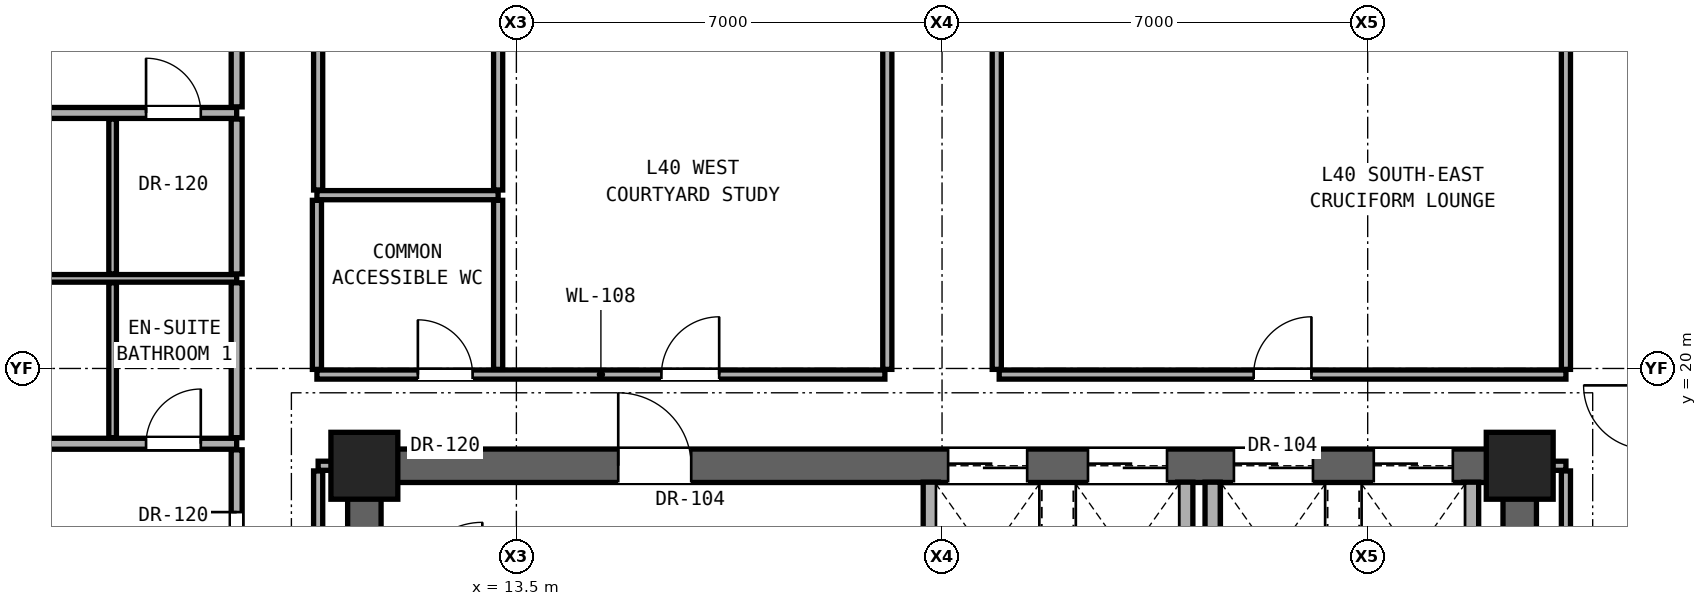
"""IFC4 building model, lengths in metres.
Left out: names, types, materials, properties, quantities, classifications, styles, units other than length and angle.
Written with IfcOpenShell. Run it as: python <this file> out.ifc"""

import sys

from ifc_helpers import new_model, si_unit, direction, frame, frame_2d, origin, origin_2d, place, context, subcontext, project, spatial, rectangle, extrude, element, fill, save


model = new_model("IFC4")
c1 = context("Model", 3, precision=1e-05, world=origin(), true_north=direction((0.0, 1.0)))
c2 = subcontext(c1, "Body", "Model", "MODEL_VIEW")
j1 = project(units=[si_unit("LENGTHUNIT", "METRE"), si_unit("PLANEANGLEUNIT", "RADIAN")], contexts=[c1])
p1 = place(None, origin())
s1 = spatial("IfcSite", under=j1, at=p1, CompositionType="ELEMENT")
p2 = place(p1, origin())
s2 = spatial("IfcBuilding", under=s1, at=p2, CompositionType="ELEMENT")
p3 = place(p2, frame((0.0, 0.0, 141.2)))
s3 = spatial("IfcBuildingStorey", under=s2, at=p3, CompositionType="ELEMENT", Elevation=141.2)
for number, where, z_axis, x_axis in (
    (1, (11.0, 18.4, 0.0), (0.0, 0.0, 1.0), (1.0, 0.0, 0.0)),
    (2, (30.0, 18.4, 0.0), (0.0, 0.0, 1.0), (1.0, 0.0, 0.0)),
):
    element("IfcColumn", number, at=place(p3, frame(where, z_axis=z_axis, x_axis=x_axis)), inside=s3, PredefinedType="COLUMN", context=c2, shape_type="SweptSolid", body=[
        extrude(rectangle(XDim=1.1, YDim=1.1, at=origin_2d()), origin(), (0.0, 0.0, 1.0), 3.3),
    ])
for number, where, z_axis, x_axis in (
    (3, (11.0, 12.4, 0.0), (0.0, 0.0, 1.0), (0.0, 1.0, 0.0)),
    (4, (30.0, 12.4, 0.0), (0.0, 0.0, 1.0), (0.0, 1.0, 0.0)),
):
    element("IfcWall", number, at=place(p3, frame(where, z_axis=z_axis, x_axis=x_axis)), inside=s3, PredefinedType="SHEAR", context=c2, shape_type="SweptSolid", body=[
        extrude(rectangle(XDim=6.0, YDim=0.55, at=frame_2d((3.0, 0.0))), origin(), (0.0, 0.0, 1.0), 3.08),
    ])
p4 = place(p3, frame((11.0, 18.4, 0.0), z_axis=(0.0, 0.0, 1.0), x_axis=(1.0, 0.0, 0.0)))
e5 = element("IfcWall", 5, at=p4, inside=s3, PredefinedType="SHEAR", context=c2, shape_type="SweptSolid", body=[
    extrude(rectangle(XDim=19.0, YDim=0.55, at=frame_2d((9.5, 0.0))), origin(), (0.0, 0.0, 1.0), 3.08),
])
p5 = place(p4, frame((4.175, 0.0, 0.0)))
e6 = element("IfcOpeningElement", 6, at=p5, cuts=e5, PredefinedType="OPENING", context=c2, shape_type="SweptSolid", body=[
    extrude(rectangle(XDim=1.2, YDim=2.25, at=frame_2d((0.6, 1.125))), frame((0.0, 0.285, 0.0), z_axis=(0.0, -1.0, 0.0), x_axis=(1.0, 0.0, 0.0)), (0.0, 0.0, 1.0), 0.57),
])
p6 = place(p4, frame((9.6, 0.0, 0.0)))
e7 = element("IfcOpeningElement", 7, at=p6, cuts=e5, PredefinedType="OPENING", context=c2, shape_type="SweptSolid", body=[
    extrude(rectangle(XDim=1.3, YDim=2.3, at=frame_2d((0.65, 1.15))), frame((0.0, 0.285, 0.0), z_axis=(0.0, -1.0, 0.0), x_axis=(1.0, 0.0, 0.0)), (0.0, 0.0, 1.0), 0.57),
])
p7 = place(p4, frame((11.9, 0.0, 0.0)))
e8 = element("IfcOpeningElement", 8, at=p7, cuts=e5, PredefinedType="OPENING", context=c2, shape_type="SweptSolid", body=[
    extrude(rectangle(XDim=1.3, YDim=2.3, at=frame_2d((0.65, 1.15))), frame((0.0, 0.285, 0.0), z_axis=(0.0, -1.0, 0.0), x_axis=(1.0, 0.0, 0.0)), (0.0, 0.0, 1.0), 0.57),
])
p8 = place(p4, frame((14.3, 0.0, 0.0)))
e9 = element("IfcOpeningElement", 9, at=p8, cuts=e5, PredefinedType="OPENING", context=c2, shape_type="SweptSolid", body=[
    extrude(rectangle(XDim=1.3, YDim=2.3, at=frame_2d((0.65, 1.15))), frame((0.0, 0.285, 0.0), z_axis=(0.0, -1.0, 0.0), x_axis=(1.0, 0.0, 0.0)), (0.0, 0.0, 1.0), 0.57),
])
p9 = place(p4, frame((16.6, 0.0, 0.0)))
e10 = element("IfcOpeningElement", 10, at=p9, cuts=e5, PredefinedType="OPENING", context=c2, shape_type="SweptSolid", body=[
    extrude(rectangle(XDim=1.3, YDim=2.3, at=frame_2d((0.65, 1.15))), frame((0.0, 0.285, 0.0), z_axis=(0.0, -1.0, 0.0), x_axis=(1.0, 0.0, 0.0)), (0.0, 0.0, 1.0), 0.57),
])
for number, where, z_axis, x_axis in (
    (11, (10.24, 18.4, 0.0), (0.0, 0.0, 1.0), (1.0, 0.0, 0.0)),
    (12, (30.27, 18.4, 0.0), (0.0, 0.0, 1.0), (1.0, 0.0, 0.0)),
):
    element("IfcWall", number, at=place(p3, frame(where, z_axis=z_axis, x_axis=x_axis)), inside=s3, PredefinedType="PARTITIONING", context=c2, shape_type="SweptSolid", body=[
        extrude(rectangle(XDim=0.49, YDim=0.15, at=frame_2d((0.245, 0.0))), origin(), (0.0, 0.0, 1.0), 2.456),
    ])
p10 = place(p3, frame((-1.34, 18.762, 0.0), z_axis=(0.0, 0.0, 1.0), x_axis=(1.0, 0.0, 0.0)))
e13 = element("IfcWall", 13, at=p10, inside=s3, PredefinedType="PARTITIONING", context=c2, shape_type="SweptSolid", body=[
    extrude(rectangle(XDim=10.24, YDim=0.18, at=frame_2d((5.12, 0.0))), origin(), (0.0, 0.0, 1.0), 2.299),
])
p11 = place(p10, frame((4.245, 0.0, 0.0)))
e14 = element("IfcOpeningElement", 14, at=p11, cuts=e13, PredefinedType="OPENING", context=c2, shape_type="SweptSolid", body=[
    extrude(rectangle(XDim=0.95, YDim=2.15, at=frame_2d((0.475, 1.075))), frame((0.0, 0.1, 0.0), z_axis=(0.0, -1.0, 0.0), x_axis=(1.0, 0.0, 0.0)), (0.0, 0.0, 1.0), 0.2),
])
p12 = place(p10, frame((8.75, 0.0, 0.0)))
e15 = element("IfcOpeningElement", 15, at=p12, cuts=e13, PredefinedType="OPENING", context=c2, shape_type="SweptSolid", body=[
    extrude(rectangle(XDim=0.9, YDim=2.1, at=frame_2d((0.45, 1.05))), frame((0.0, 0.1, 0.0), z_axis=(0.0, -1.0, 0.0), x_axis=(1.0, 0.0, 0.0)), (0.0, 0.0, 1.0), 0.2),
])
p13 = place(p3, frame((10.22, 19.9, 0.0), z_axis=(0.0, 0.0, 1.0), x_axis=(1.0, 0.0, 0.0)))
e16 = element("IfcWall", 16, at=p13, inside=s3, PredefinedType="PARTITIONING", context=c2, shape_type="SweptSolid", body=[
    extrude(rectangle(XDim=9.34, YDim=0.15, at=frame_2d((4.67, 0.0))), origin(), (0.0, 0.0, 1.0), 2.216),
])
p14 = place(p13, frame((1.66, 0.0, 0.0)))
e17 = element("IfcOpeningElement", 17, at=p14, cuts=e16, PredefinedType="OPENING", context=c2, shape_type="SweptSolid", body=[
    extrude(rectangle(XDim=0.9, YDim=2.1, at=frame_2d((0.45, 1.05))), frame((0.0, 0.085, 0.0), z_axis=(0.0, -1.0, 0.0), x_axis=(1.0, 0.0, 0.0)), (0.0, 0.0, 1.0), 0.17),
])
p15 = place(p13, frame((5.665, 0.0, 0.0)))
e18 = element("IfcOpeningElement", 18, at=p15, cuts=e16, PredefinedType="OPENING", context=c2, shape_type="SweptSolid", body=[
    extrude(rectangle(XDim=0.95, YDim=2.15, at=frame_2d((0.475, 1.075))), frame((0.0, 0.085, 0.0), z_axis=(0.0, -1.0, 0.0), x_axis=(1.0, 0.0, 0.0)), (0.0, 0.0, 1.0), 0.17),
])
p16 = place(p3, frame((21.44, 19.9, 0.0), z_axis=(0.0, 0.0, 1.0), x_axis=(1.0, 0.0, 0.0)))
e19 = element("IfcWall", 19, at=p16, inside=s3, PredefinedType="PARTITIONING", context=c2, shape_type="SweptSolid", body=[
    extrude(rectangle(XDim=9.32, YDim=0.15, at=frame_2d((4.66, 0.0))), origin(), (0.0, 0.0, 1.0), 2.216),
])
p17 = place(p16, frame((4.185, 0.0, 0.0)))
e20 = element("IfcOpeningElement", 20, at=p17, cuts=e19, PredefinedType="OPENING", context=c2, shape_type="SweptSolid", body=[
    extrude(rectangle(XDim=0.95, YDim=2.15, at=frame_2d((0.475, 1.075))), frame((0.0, 0.085, 0.0), z_axis=(0.0, -1.0, 0.0), x_axis=(1.0, 0.0, 0.0)), (0.0, 0.0, 1.0), 0.17),
])
p18 = place(p3, frame((-1.34, 21.482, 0.0), z_axis=(0.0, 0.0, 1.0), x_axis=(1.0, 0.0, 0.0)))
e21 = element("IfcWall", 21, at=p18, inside=s3, PredefinedType="PARTITIONING", context=c2, shape_type="SweptSolid", body=[
    extrude(rectangle(XDim=10.24, YDim=0.125, at=frame_2d((5.12, 0.0))), origin(), (0.0, 0.0, 1.0), 2.299),
])
p19 = place(p3, frame((10.22, 22.85, 0.0), z_axis=(0.0, 0.0, 1.0), x_axis=(1.0, 0.0, 0.0)))
e22 = element("IfcWall", 22, at=p19, inside=s3, PredefinedType="PARTITIONING", context=c2, shape_type="SweptSolid", body=[
    extrude(rectangle(XDim=2.98, YDim=0.15, at=frame_2d((1.49, 0.0))), origin(), (0.0, 0.0, 1.0), 2.216),
])
p20 = place(p3, frame((-1.34, 24.202, 0.0), z_axis=(0.0, 0.0, 1.0), x_axis=(1.0, 0.0, 0.0)))
e23 = element("IfcWall", 23, at=p20, inside=s3, PredefinedType="PARTITIONING", context=c2, shape_type="SweptSolid", body=[
    extrude(rectangle(XDim=10.24, YDim=0.18, at=frame_2d((5.12, 0.0))), origin(), (0.0, 0.0, 1.0), 2.299),
])
p21 = place(p20, frame((4.245, 0.0, 0.0)))
e24 = element("IfcOpeningElement", 24, at=p21, cuts=e23, PredefinedType="OPENING", context=c2, shape_type="SweptSolid", body=[
    extrude(rectangle(XDim=0.95, YDim=2.15, at=frame_2d((0.475, 1.075))), frame((0.0, 0.1, 0.0), z_axis=(0.0, -1.0, 0.0), x_axis=(1.0, 0.0, 0.0)), (0.0, 0.0, 1.0), 0.2),
])
p22 = place(p20, frame((8.75, 0.0, 0.0)))
e25 = element("IfcOpeningElement", 25, at=p22, cuts=e23, PredefinedType="OPENING", context=c2, shape_type="SweptSolid", body=[
    extrude(rectangle(XDim=0.9, YDim=2.1, at=frame_2d((0.45, 1.05))), frame((0.0, 0.1, 0.0), z_axis=(0.0, -1.0, 0.0), x_axis=(1.0, 0.0, 0.0)), (0.0, 0.0, 1.0), 0.2),
])
p23 = place(p3, frame((6.86, 18.862, 0.0), z_axis=(0.0, 0.0, 1.0), x_axis=(0.0, 1.0, 0.0)))
e26 = element("IfcWall", 26, at=p23, inside=s3, PredefinedType="PARTITIONING", context=c2, shape_type="SweptSolid", body=[
    extrude(rectangle(XDim=2.547, YDim=0.125, at=frame_2d((1.274, 0.0))), origin(), (0.0, 0.0, 1.0), 3.08),
])
p24 = place(p3, frame((6.86, 21.554, 0.0), z_axis=(0.0, 0.0, 1.0), x_axis=(0.0, 1.0, 0.0)))
e27 = element("IfcWall", 27, at=p24, inside=s3, PredefinedType="PARTITIONING", context=c2, shape_type="SweptSolid", body=[
    extrude(rectangle(XDim=2.548, YDim=0.125, at=frame_2d((1.274, 0.0))), origin(), (0.0, 0.0, 1.0), 3.08),
])
p25 = place(p3, frame((8.9, 14.364, 0.0), z_axis=(0.0, 0.0, 1.0), x_axis=(0.0, 1.0, 0.0)))
e28 = element("IfcWall", 28, at=p25, inside=s3, PredefinedType="PARTITIONING", context=c2, shape_type="SweptSolid", body=[
    extrude(rectangle(XDim=4.298, YDim=0.18, at=frame_2d((2.149, 0.0))), origin(), (0.0, 0.0, 1.0), 2.456),
])
p26 = place(p25, frame((2.224, 0.0, 0.0)))
e29 = element("IfcOpeningElement", 29, at=p26, cuts=e28, PredefinedType="OPENING", context=c2, shape_type="SweptSolid", body=[
    extrude(rectangle(XDim=1.05, YDim=2.2, at=frame_2d((0.525, 1.1))), frame((0.0, 0.1, 0.0), z_axis=(0.0, -1.0, 0.0), x_axis=(1.0, 0.0, 0.0)), (0.0, 0.0, 1.0), 0.2),
])
p27 = place(p3, frame((8.9, 18.862, 0.0), z_axis=(0.0, 0.0, 1.0), x_axis=(0.0, 1.0, 0.0)))
e30 = element("IfcWall", 30, at=p27, inside=s3, PredefinedType="PARTITIONING", context=c2, shape_type="SweptSolid", body=[
    extrude(rectangle(XDim=2.547, YDim=0.18, at=frame_2d((1.274, 0.0))), origin(), (0.0, 0.0, 1.0), 3.08),
])
p28 = place(p3, frame((8.9, 21.554, 0.0), z_axis=(0.0, 0.0, 1.0), x_axis=(0.0, 1.0, 0.0)))
e31 = element("IfcWall", 31, at=p28, inside=s3, PredefinedType="PARTITIONING", context=c2, shape_type="SweptSolid", body=[
    extrude(rectangle(XDim=2.548, YDim=0.18, at=frame_2d((1.274, 0.0))), origin(), (0.0, 0.0, 1.0), 3.08),
])
p29 = place(p3, frame((8.9, 24.302, 0.0), z_axis=(0.0, 0.0, 1.0), x_axis=(0.0, 1.0, 0.0)))
e32 = element("IfcWall", 32, at=p29, inside=s3, PredefinedType="PARTITIONING", context=c2, shape_type="SweptSolid", body=[
    extrude(rectangle(XDim=3.406, YDim=0.18, at=frame_2d((1.703, 0.0))), origin(), (0.0, 0.0, 1.0), 2.299),
])
p30 = place(p29, frame((1.178, 0.0, 0.0)))
e33 = element("IfcOpeningElement", 33, at=p30, cuts=e32, PredefinedType="OPENING", context=c2, shape_type="SweptSolid", body=[
    extrude(rectangle(XDim=1.05, YDim=2.2, at=frame_2d((0.525, 1.1))), frame((0.0, 0.1, 0.0), z_axis=(0.0, -1.0, 0.0), x_axis=(1.0, 0.0, 0.0)), (0.0, 0.0, 1.0), 0.2),
])
p31 = place(p3, frame((10.22, 19.985, 0.0), z_axis=(0.0, 0.0, 1.0), x_axis=(0.0, 1.0, 0.0)))
e34 = element("IfcWall", 34, at=p31, inside=s3, PredefinedType="PARTITIONING", context=c2, shape_type="SweptSolid", body=[
    extrude(rectangle(XDim=2.78, YDim=0.15, at=frame_2d((1.39, 0.0))), origin(), (0.0, 0.0, 1.0), 3.08),
])
p32 = place(p3, frame((10.24, 12.335, 0.0), z_axis=(0.0, 0.0, 1.0), x_axis=(0.0, 1.0, 0.0)))
e35 = element("IfcWall", 35, at=p32, inside=s3, PredefinedType="PARTITIONING", context=c2, shape_type="SweptSolid", body=[
    extrude(rectangle(XDim=5.98, YDim=0.15, at=frame_2d((2.99, 0.0))), origin(), (0.0, 0.0, 1.0), 2.456),
])
p33 = place(p3, frame((10.24, 22.935, 0.0), z_axis=(0.0, 0.0, 1.0), x_axis=(0.0, 1.0, 0.0)))
e36 = element("IfcWall", 36, at=p33, inside=s3, PredefinedType="PARTITIONING", context=c2, shape_type="SweptSolid", body=[
    extrude(rectangle(XDim=2.58, YDim=0.15, at=frame_2d((1.29, 0.0))), origin(), (0.0, 0.0, 1.0), 2.299),
])
p34 = place(p3, frame((13.2, 19.985, 0.0), z_axis=(0.0, 0.0, 1.0), x_axis=(0.0, 1.0, 0.0)))
e37 = element("IfcWall", 37, at=p34, inside=s3, PredefinedType="PARTITIONING", context=c2, shape_type="SweptSolid", body=[
    extrude(rectangle(XDim=2.78, YDim=0.15, at=frame_2d((1.39, 0.0))), origin(), (0.0, 0.0, 1.0), 3.08),
])
p35 = place(p3, frame((13.2, 22.935, 0.0), z_axis=(0.0, 0.0, 1.0), x_axis=(0.0, 1.0, 0.0)))
e38 = element("IfcWall", 38, at=p35, inside=s3, PredefinedType="PARTITIONING", context=c2, shape_type="SweptSolid", body=[
    extrude(rectangle(XDim=2.58, YDim=0.15, at=frame_2d((1.29, 0.0))), origin(), (0.0, 0.0, 1.0), 2.216),
])
p36 = place(p3, frame((19.6, 19.985, 0.0), z_axis=(0.0, 0.0, 1.0), x_axis=(0.0, 1.0, 0.0)))
e39 = element("IfcWall", 39, at=p36, inside=s3, PredefinedType="PARTITIONING", context=c2, shape_type="SweptSolid", body=[
    extrude(rectangle(XDim=5.53, YDim=0.15, at=frame_2d((2.765, 0.0))), origin(), (0.0, 0.0, 1.0), 2.216),
])
p37 = place(p3, frame((20.315, 16.555, 0.0), z_axis=(0.0, 0.0, 1.0), x_axis=(0.0, 1.0, 0.0)))
e40 = element("IfcWall", 40, at=p37, inside=s3, PredefinedType="SOLIDWALL", context=c2, shape_type="SweptSolid", body=[
    extrude(rectangle(XDim=1.575, YDim=0.25, at=frame_2d((0.788, 0.0))), origin(), (0.0, 0.0, 1.0), 3.08),
])
p38 = place(p3, frame((21.4, 19.985, 0.0), z_axis=(0.0, 0.0, 1.0), x_axis=(0.0, 1.0, 0.0)))
e41 = element("IfcWall", 41, at=p38, inside=s3, PredefinedType="PARTITIONING", context=c2, shape_type="SweptSolid", body=[
    extrude(rectangle(XDim=5.53, YDim=0.15, at=frame_2d((2.765, 0.0))), origin(), (0.0, 0.0, 1.0), 2.216),
])
for number, where, z_axis, x_axis in (
    (42, (24.5, 15.785, 0.0), (0.0, 0.0, 1.0), (0.0, 1.0, 0.0)),
    (43, (24.95, 15.785, 0.0), (0.0, 0.0, 1.0), (0.0, 1.0, 0.0)),
    (44, (29.2, 15.785, 0.0), (0.0, 0.0, 1.0), (0.0, 1.0, 0.0)),
):
    element("IfcWall", number, at=place(p3, frame(where, z_axis=z_axis, x_axis=x_axis)), inside=s3, PredefinedType="SOLIDWALL", context=c2, shape_type="SweptSolid", body=[
        extrude(rectangle(XDim=2.345, YDim=0.25, at=frame_2d((1.172, 0.0))), origin(), (0.0, 0.0, 1.0), 3.08),
    ])
p39 = place(p3, frame((30.76, 12.335, 0.0), z_axis=(0.0, 0.0, 1.0), x_axis=(0.0, 1.0, 0.0)))
e45 = element("IfcWall", 45, at=p39, inside=s3, PredefinedType="PARTITIONING", context=c2, shape_type="SweptSolid", body=[
    extrude(rectangle(XDim=5.98, YDim=0.15, at=frame_2d((2.99, 0.0))), origin(), (0.0, 0.0, 1.0), 2.456),
])
p40 = place(p3, frame((30.76, 19.985, 0.0), z_axis=(0.0, 0.0, 1.0), x_axis=(0.0, 1.0, 0.0)))
e46 = element("IfcWall", 46, at=p40, inside=s3, PredefinedType="PARTITIONING", context=c2, shape_type="SweptSolid", body=[
    extrude(rectangle(XDim=5.53, YDim=0.15, at=frame_2d((2.765, 0.0))), origin(), (0.0, 0.0, 1.0), 2.299),
])
p41 = place(p5, origin())
e47 = element("IfcDoor", 47, at=p41, inside=s3, OperationType="SINGLE_SWING_LEFT", PredefinedType="DOOR", context=c2, shape_type="SweptSolid", body=[
    extrude(rectangle(XDim=1.2, YDim=2.25, at=frame_2d((0.6, 1.125))), frame((0.0, 0.025, 0.0), z_axis=(0.0, -1.0, 0.0), x_axis=(1.0, 0.0, 0.0)), (0.0, 0.0, 1.0), 0.05),
])
fill(e6, e47)
p42 = place(p14, origin())
e48 = element("IfcDoor", 48, at=p42, inside=s3, OperationType="SINGLE_SWING_LEFT", PredefinedType="DOOR", context=c2, shape_type="SweptSolid", body=[
    extrude(rectangle(XDim=0.9, YDim=2.1, at=frame_2d((0.45, 1.05))), frame((0.0, 0.025, 0.0), z_axis=(0.0, -1.0, 0.0), x_axis=(1.0, 0.0, 0.0)), (0.0, 0.0, 1.0), 0.05),
])
fill(e17, e48)
p43 = place(p26, origin())
e49 = element("IfcDoor", 49, at=p43, inside=s3, OperationType="SINGLE_SWING_RIGHT", PredefinedType="DOOR", context=c2, shape_type="SweptSolid", body=[
    extrude(rectangle(XDim=1.05, YDim=2.2, at=frame_2d((0.525, 1.1))), frame((0.0, 0.025, 0.0), z_axis=(0.0, -1.0, 0.0), x_axis=(1.0, 0.0, 0.0)), (0.0, 0.0, 1.0), 0.05),
])
fill(e29, e49)
p44 = place(p12, origin())
e50 = element("IfcDoor", 50, at=p44, inside=s3, OperationType="SINGLE_SWING_RIGHT", PredefinedType="DOOR", context=c2, shape_type="SweptSolid", body=[
    extrude(rectangle(XDim=0.9, YDim=2.1, at=frame_2d((0.45, 1.05))), frame((0.0, 0.025, 0.0), z_axis=(0.0, -1.0, 0.0), x_axis=(1.0, 0.0, 0.0)), (0.0, 0.0, 1.0), 0.05),
])
fill(e15, e50)
p45 = place(p22, origin())
e51 = element("IfcDoor", 51, at=p45, inside=s3, OperationType="SINGLE_SWING_LEFT", PredefinedType="DOOR", context=c2, shape_type="SweptSolid", body=[
    extrude(rectangle(XDim=0.9, YDim=2.1, at=frame_2d((0.45, 1.05))), frame((0.0, 0.025, 0.0), z_axis=(0.0, -1.0, 0.0), x_axis=(1.0, 0.0, 0.0)), (0.0, 0.0, 1.0), 0.05),
])
fill(e25, e51)
p46 = place(p15, origin())
e52 = element("IfcDoor", 52, at=p46, inside=s3, OperationType="SINGLE_SWING_RIGHT", PredefinedType="DOOR", context=c2, shape_type="SweptSolid", body=[
    extrude(rectangle(XDim=0.95, YDim=2.15, at=frame_2d((0.475, 1.075))), frame((0.0, 0.025, 0.0), z_axis=(0.0, -1.0, 0.0), x_axis=(1.0, 0.0, 0.0)), (0.0, 0.0, 1.0), 0.05),
])
fill(e18, e52)
p47 = place(p17, origin())
e53 = element("IfcDoor", 53, at=p47, inside=s3, OperationType="SINGLE_SWING_RIGHT", PredefinedType="DOOR", context=c2, shape_type="SweptSolid", body=[
    extrude(rectangle(XDim=0.95, YDim=2.15, at=frame_2d((0.475, 1.075))), frame((0.0, 0.025, 0.0), z_axis=(0.0, -1.0, 0.0), x_axis=(1.0, 0.0, 0.0)), (0.0, 0.0, 1.0), 0.05),
])
fill(e20, e53)
p48 = place(p6, origin())
e54 = element("IfcDoor", 54, at=p48, inside=s3, OperationType="DOUBLE_DOOR_SLIDING", PredefinedType="DOOR", context=c2, shape_type="SweptSolid", body=[
    extrude(rectangle(XDim=1.3, YDim=2.3, at=frame_2d((0.65, 1.15))), frame((0.0, 0.025, 0.0), z_axis=(0.0, -1.0, 0.0), x_axis=(1.0, 0.0, 0.0)), (0.0, 0.0, 1.0), 0.05),
])
fill(e7, e54)
p49 = place(p7, origin())
e55 = element("IfcDoor", 55, at=p49, inside=s3, OperationType="DOUBLE_DOOR_SLIDING", PredefinedType="DOOR", context=c2, shape_type="SweptSolid", body=[
    extrude(rectangle(XDim=1.3, YDim=2.3, at=frame_2d((0.65, 1.15))), frame((0.0, 0.025, 0.0), z_axis=(0.0, -1.0, 0.0), x_axis=(1.0, 0.0, 0.0)), (0.0, 0.0, 1.0), 0.05),
])
fill(e8, e55)
p50 = place(p8, origin())
e56 = element("IfcDoor", 56, at=p50, inside=s3, OperationType="DOUBLE_DOOR_SLIDING", PredefinedType="DOOR", context=c2, shape_type="SweptSolid", body=[
    extrude(rectangle(XDim=1.3, YDim=2.3, at=frame_2d((0.65, 1.15))), frame((0.0, 0.025, 0.0), z_axis=(0.0, -1.0, 0.0), x_axis=(1.0, 0.0, 0.0)), (0.0, 0.0, 1.0), 0.05),
])
fill(e9, e56)
p51 = place(p9, origin())
e57 = element("IfcDoor", 57, at=p51, inside=s3, OperationType="DOUBLE_DOOR_SLIDING", PredefinedType="DOOR", context=c2, shape_type="SweptSolid", body=[
    extrude(rectangle(XDim=1.3, YDim=2.3, at=frame_2d((0.65, 1.15))), frame((0.0, 0.025, 0.0), z_axis=(0.0, -1.0, 0.0), x_axis=(1.0, 0.0, 0.0)), (0.0, 0.0, 1.0), 0.05),
])
fill(e10, e57)
save(model, sys.argv[1])
